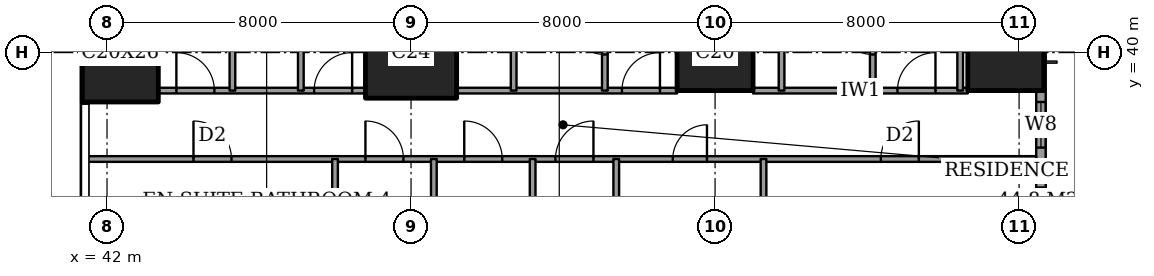
"""IFC4 building model, lengths in metres.
Left out: names, types, materials, properties, quantities, classifications, styles, units other than length and angle.
Written with IfcOpenShell. Run it as: python <this file> out.ifc"""

import sys

from ifc_helpers import new_model, si_unit, direction, frame, frame_2d, origin, origin_2d, place, context, subcontext, project, spatial, rectangle, extrude, element, fill, save


model = new_model("IFC4")
c1 = context("Model", 3, precision=1e-05, world=origin(), true_north=direction((0.0, 1.0)))
c2 = subcontext(c1, "Body", "Model", "MODEL_VIEW")
j1 = project(units=[si_unit("LENGTHUNIT", "METRE"), si_unit("PLANEANGLEUNIT", "RADIAN")], contexts=[c1])
p1 = place(None, origin())
s1 = spatial("IfcSite", under=j1, at=p1, CompositionType="ELEMENT")
p2 = place(p1, origin())
s2 = spatial("IfcBuilding", under=s1, at=p2, CompositionType="ELEMENT")
p3 = place(p2, frame((0.0, 0.0, 62.0)))
s3 = spatial("IfcBuildingStorey", under=s2, at=p3, CompositionType="ELEMENT", Elevation=62.0)
p4 = place(p3, frame((42.35, 40.0, 0.0), z_axis=(0.0, 0.0, 1.0), x_axis=(1.0, 0.0, 0.0)))
e1 = element("IfcColumn", 1, at=p4, inside=s3, PredefinedType="COLUMN", context=c2, shape_type="SweptSolid", body=[
    extrude(rectangle(XDim=2.0, YDim=2.6, at=origin_2d()), origin(), (0.0, 0.0, 1.0), 3.6),
])
p5 = place(p3, frame((50.0, 40.0, 0.0), z_axis=(0.0, 0.0, 1.0), x_axis=(1.0, 0.0, 0.0)))
e2 = element("IfcColumn", 2, at=p5, inside=s3, PredefinedType="COLUMN", context=c2, shape_type="SweptSolid", body=[
    extrude(rectangle(XDim=2.4, YDim=2.4, at=origin_2d()), origin(), (0.0, 0.0, 1.0), 3.6),
])
for number, where, z_axis, x_axis in (
    (3, (58.0, 40.0, 0.0), (0.0, 0.0, 1.0), (1.0, 0.0, 0.0)),
    (4, (65.65, 40.0, 0.0), (0.0, 0.0, 1.0), (1.0, 0.0, 0.0)),
):
    element("IfcColumn", number, at=place(p3, frame(where, z_axis=z_axis, x_axis=x_axis)), inside=s3, PredefinedType="COLUMN", context=c2, shape_type="SweptSolid", body=[
        extrude(rectangle(XDim=2.0, YDim=2.0, at=origin_2d()), origin(), (0.0, 0.0, 1.0), 3.6),
    ])
p6 = place(p3, frame((66.575, 3.175, 0.0), z_axis=(0.0, 0.0, 1.0), x_axis=(0.0, 1.0, 0.0)))
e5 = element("IfcWall", 5, at=p6, inside=s3, PredefinedType="SOLIDWALL", context=c2, shape_type="SweptSolid", body=[
    extrude(rectangle(XDim=41.65, YDim=0.25, at=frame_2d((20.825, 0.0))), origin(), (0.0, 0.0, 1.0), 3.6),
])
p7 = place(p6, frame((0.775, 0.0, 0.6)))
e6 = element("IfcOpeningElement", 6, at=p7, cuts=e5, PredefinedType="OPENING", context=c2, shape_type="SweptSolid", body=[
    extrude(rectangle(XDim=2.4, YDim=2.0, at=frame_2d((1.2, 1.0))), frame((0.0, 0.135, 0.0), z_axis=(0.0, -1.0, 0.0), x_axis=(1.0, 0.0, 0.0)), (0.0, 0.0, 1.0), 0.27),
])
p8 = place(p6, frame((6.1, 0.0, 0.6)))
e7 = element("IfcOpeningElement", 7, at=p8, cuts=e5, PredefinedType="OPENING", context=c2, shape_type="SweptSolid", body=[
    extrude(rectangle(XDim=1.2, YDim=2.0, at=frame_2d((0.6, 1.0))), frame((0.0, 0.135, 0.0), z_axis=(0.0, -1.0, 0.0), x_axis=(1.0, 0.0, 0.0)), (0.0, 0.0, 1.0), 0.27),
])
p9 = place(p6, frame((8.275, 0.0, 0.6)))
e8 = element("IfcOpeningElement", 8, at=p9, cuts=e5, PredefinedType="OPENING", context=c2, shape_type="SweptSolid", body=[
    extrude(rectangle(XDim=2.4, YDim=2.0, at=frame_2d((1.2, 1.0))), frame((0.0, 0.135, 0.0), z_axis=(0.0, -1.0, 0.0), x_axis=(1.0, 0.0, 0.0)), (0.0, 0.0, 1.0), 0.27),
])
p10 = place(p6, frame((15.775, 0.0, 0.6)))
e9 = element("IfcOpeningElement", 9, at=p10, cuts=e5, PredefinedType="OPENING", context=c2, shape_type="SweptSolid", body=[
    extrude(rectangle(XDim=2.4, YDim=2.0, at=frame_2d((1.2, 1.0))), frame((0.0, 0.135, 0.0), z_axis=(0.0, -1.0, 0.0), x_axis=(1.0, 0.0, 0.0)), (0.0, 0.0, 1.0), 0.27),
])
p11 = place(p6, frame((23.475, 0.0, 0.6)))
e10 = element("IfcOpeningElement", 10, at=p11, cuts=e5, PredefinedType="OPENING", context=c2, shape_type="SweptSolid", body=[
    extrude(rectangle(XDim=2.4, YDim=2.0, at=frame_2d((1.2, 1.0))), frame((0.0, 0.135, 0.0), z_axis=(0.0, -1.0, 0.0), x_axis=(1.0, 0.0, 0.0)), (0.0, 0.0, 1.0), 0.27),
])
p12 = place(p6, frame((30.875, 0.0, 0.6)))
e11 = element("IfcOpeningElement", 11, at=p12, cuts=e5, PredefinedType="OPENING", context=c2, shape_type="SweptSolid", body=[
    extrude(rectangle(XDim=2.4, YDim=2.0, at=frame_2d((1.2, 1.0))), frame((0.0, 0.135, 0.0), z_axis=(0.0, -1.0, 0.0), x_axis=(1.0, 0.0, 0.0)), (0.0, 0.0, 1.0), 0.27),
])
p13 = place(p6, frame((34.325, 0.0, 0.6)))
e12 = element("IfcOpeningElement", 12, at=p13, cuts=e5, PredefinedType="OPENING", context=c2, shape_type="SweptSolid", body=[
    extrude(rectangle(XDim=1.2, YDim=2.0, at=frame_2d((0.6, 1.0))), frame((0.0, 0.135, 0.0), z_axis=(0.0, -1.0, 0.0), x_axis=(1.0, 0.0, 0.0)), (0.0, 0.0, 1.0), 0.27),
])
p14 = place(p6, frame((38.475, 0.0, 0.6)))
e13 = element("IfcOpeningElement", 13, at=p14, cuts=e5, PredefinedType="OPENING", context=c2, shape_type="SweptSolid", body=[
    extrude(rectangle(XDim=2.4, YDim=2.0, at=frame_2d((1.2, 1.0))), frame((0.0, 0.135, 0.0), z_axis=(0.0, -1.0, 0.0), x_axis=(1.0, 0.0, 0.0)), (0.0, 0.0, 1.0), 0.27),
])
p15 = place(p3, frame((41.439, 37.2, 0.0), z_axis=(0.0, 0.0, 1.0), x_axis=(1.0, 0.0, 0.0)))
e14 = element("IfcWall", 14, at=p15, inside=s3, PredefinedType="PARTITIONING", context=c2, shape_type="SweptSolid", body=[
    extrude(rectangle(XDim=25.011, YDim=0.15, at=frame_2d((12.505, 0.0))), origin(), (0.0, 0.0, 1.0), 3.35),
])
p16 = place(p15, frame((12.361, 0.0, 0.0)))
e15 = element("IfcOpeningElement", 15, at=p16, cuts=e14, PredefinedType="OPENING", context=c2, shape_type="SweptSolid", body=[
    extrude(rectangle(XDim=1.0, YDim=2.1, at=frame_2d((0.5, 1.05))), frame((0.0, 0.085, 0.0), z_axis=(0.0, -1.0, 0.0), x_axis=(1.0, 0.0, 0.0)), (0.0, 0.0, 1.0), 0.17),
])
p17 = place(p15, frame((20.924, 0.0, 0.0)))
e16 = element("IfcOpeningElement", 16, at=p17, cuts=e14, PredefinedType="OPENING", context=c2, shape_type="SweptSolid", body=[
    extrude(rectangle(XDim=1.0, YDim=2.1, at=frame_2d((0.5, 1.05))), frame((0.0, 0.085, 0.0), z_axis=(0.0, -1.0, 0.0), x_axis=(1.0, 0.0, 0.0)), (0.0, 0.0, 1.0), 0.17),
])
p18 = place(p15, frame((15.448, 0.0, 0.0)))
e17 = element("IfcOpeningElement", 17, at=p18, cuts=e14, PredefinedType="OPENING", context=c2, shape_type="SweptSolid", body=[
    extrude(rectangle(XDim=0.9, YDim=2.1, at=frame_2d((0.45, 1.05))), frame((0.0, 0.085, 0.0), z_axis=(0.0, -1.0, 0.0), x_axis=(1.0, 0.0, 0.0)), (0.0, 0.0, 1.0), 0.17),
])
p19 = place(p15, frame((9.961, 0.0, 0.0)))
e18 = element("IfcOpeningElement", 18, at=p19, cuts=e14, PredefinedType="OPENING", context=c2, shape_type="SweptSolid", body=[
    extrude(rectangle(XDim=1.0, YDim=2.1, at=frame_2d((0.5, 1.05))), frame((0.0, 0.085, 0.0), z_axis=(0.0, -1.0, 0.0), x_axis=(1.0, 0.0, 0.0)), (0.0, 0.0, 1.0), 0.17),
])
p20 = place(p15, frame((7.361, 0.0, 0.0)))
e19 = element("IfcOpeningElement", 19, at=p20, cuts=e14, PredefinedType="OPENING", context=c2, shape_type="SweptSolid", body=[
    extrude(rectangle(XDim=1.0, YDim=2.1, at=frame_2d((0.5, 1.05))), frame((0.0, 0.085, 0.0), z_axis=(0.0, -1.0, 0.0), x_axis=(1.0, 0.0, 0.0)), (0.0, 0.0, 1.0), 0.17),
])
p21 = place(p15, frame((2.836, 0.0, 0.0)))
e20 = element("IfcOpeningElement", 20, at=p21, cuts=e14, PredefinedType="OPENING", context=c2, shape_type="SweptSolid", body=[
    extrude(rectangle(XDim=1.0, YDim=2.1, at=frame_2d((0.5, 1.05))), frame((0.0, 0.085, 0.0), z_axis=(0.0, -1.0, 0.0), x_axis=(1.0, 0.0, 0.0)), (0.0, 0.0, 1.0), 0.17),
])
p22 = place(p3, frame((43.35, 39.0, 0.0), z_axis=(0.0, 0.0, 1.0), x_axis=(1.0, 0.0, 0.0)))
e21 = element("IfcWall", 21, at=p22, inside=s3, PredefinedType="PARTITIONING", context=c2, shape_type="SweptSolid", body=[
    extrude(rectangle(XDim=5.45, YDim=0.15, at=frame_2d((2.725, 0.0))), origin(), (0.0, 0.0, 1.0), 3.35),
])
p23 = place(p22, frame((4.1, 0.0, 0.0)))
e22 = element("IfcOpeningElement", 22, at=p23, cuts=e21, PredefinedType="OPENING", context=c2, shape_type="SweptSolid", body=[
    extrude(rectangle(XDim=1.0, YDim=2.1, at=frame_2d((0.5, 1.05))), frame((0.0, 0.085, 0.0), z_axis=(0.0, -1.0, 0.0), x_axis=(1.0, 0.0, 0.0)), (0.0, 0.0, 1.0), 0.17),
])
p24 = place(p22, frame((0.475, 0.0, 0.0)))
e23 = element("IfcOpeningElement", 23, at=p24, cuts=e21, PredefinedType="OPENING", context=c2, shape_type="SweptSolid", body=[
    extrude(rectangle(XDim=1.0, YDim=2.1, at=frame_2d((0.5, 1.05))), frame((0.0, 0.085, 0.0), z_axis=(0.0, -1.0, 0.0), x_axis=(1.0, 0.0, 0.0)), (0.0, 0.0, 1.0), 0.17),
])
p25 = place(p3, frame((51.2, 39.0, 0.0), z_axis=(0.0, 0.0, 1.0), x_axis=(1.0, 0.0, 0.0)))
e24 = element("IfcWall", 24, at=p25, inside=s3, PredefinedType="PARTITIONING", context=c2, shape_type="SweptSolid", body=[
    extrude(rectangle(XDim=5.8, YDim=0.15, at=frame_2d((2.9, 0.0))), origin(), (0.0, 0.0, 1.0), 3.35),
])
p26 = place(p25, frame((4.35, 0.0, 0.0)))
e25 = element("IfcOpeningElement", 25, at=p26, cuts=e24, PredefinedType="OPENING", context=c2, shape_type="SweptSolid", body=[
    extrude(rectangle(XDim=1.0, YDim=2.1, at=frame_2d((0.5, 1.05))), frame((0.0, 0.085, 0.0), z_axis=(0.0, -1.0, 0.0), x_axis=(1.0, 0.0, 0.0)), (0.0, 0.0, 1.0), 0.17),
])
p27 = place(p3, frame((59.0, 39.0, 0.0), z_axis=(0.0, 0.0, 1.0), x_axis=(1.0, 0.0, 0.0)))
e26 = element("IfcWall", 26, at=p27, inside=s3, PredefinedType="PARTITIONING", context=c2, shape_type="SweptSolid", body=[
    extrude(rectangle(XDim=5.65, YDim=0.15, at=frame_2d((2.825, 0.0))), origin(), (0.0, 0.0, 1.0), 3.35),
])
p28 = place(p27, frame((3.8, 0.0, 0.0)))
e27 = element("IfcOpeningElement", 27, at=p28, cuts=e26, PredefinedType="OPENING", context=c2, shape_type="SweptSolid", body=[
    extrude(rectangle(XDim=1.0, YDim=2.1, at=frame_2d((0.5, 1.05))), frame((0.0, 0.085, 0.0), z_axis=(0.0, -1.0, 0.0), x_axis=(1.0, 0.0, 0.0)), (0.0, 0.0, 1.0), 0.17),
])
p29 = place(p3, frame((45.3, 39.0, 0.0), z_axis=(0.0, 0.0, 1.0), x_axis=(0.0, 1.0, 0.0)))
e28 = element("IfcWall", 28, at=p29, inside=s3, PredefinedType="PARTITIONING", context=c2, shape_type="SweptSolid", body=[
    extrude(rectangle(XDim=9.45, YDim=0.15, at=frame_2d((4.725, 0.0))), origin(), (0.0, 0.0, 1.0), 3.35),
])
p30 = place(p3, frame((47.1, 39.0, 0.0), z_axis=(0.0, 0.0, 1.0), x_axis=(0.0, 1.0, 0.0)))
e29 = element("IfcWall", 29, at=p30, inside=s3, PredefinedType="PARTITIONING", context=c2, shape_type="SweptSolid", body=[
    extrude(rectangle(XDim=3.8, YDim=0.15, at=frame_2d((1.9, 0.0))), origin(), (0.0, 0.0, 1.0), 3.35),
])
p31 = place(p30, frame((1.45, 0.0, 0.0)))
e30 = element("IfcOpeningElement", 30, at=p31, cuts=e29, PredefinedType="OPENING", context=c2, shape_type="SweptSolid", body=[
    extrude(rectangle(XDim=0.9, YDim=2.1, at=frame_2d((0.45, 1.05))), frame((0.0, 0.085, 0.0), z_axis=(0.0, -1.0, 0.0), x_axis=(1.0, 0.0, 0.0)), (0.0, 0.0, 1.0), 0.17),
])
p32 = place(p3, frame((48.0, 30.5, 0.0), z_axis=(0.0, 0.0, 1.0), x_axis=(0.0, 1.0, 0.0)))
e31 = element("IfcWall", 31, at=p32, inside=s3, PredefinedType="PARTITIONING", context=c2, shape_type="SweptSolid", body=[
    extrude(rectangle(XDim=6.7, YDim=0.15, at=frame_2d((3.35, 0.0))), origin(), (0.0, 0.0, 1.0), 3.35),
])
p33 = place(p3, frame((50.6, 33.2, 0.0), z_axis=(0.0, 0.0, 1.0), x_axis=(0.0, 1.0, 0.0)))
e32 = element("IfcWall", 32, at=p33, inside=s3, PredefinedType="PARTITIONING", context=c2, shape_type="SweptSolid", body=[
    extrude(rectangle(XDim=4.0, YDim=0.15, at=frame_2d((2.0, 0.0))), origin(), (0.0, 0.0, 1.0), 3.35),
])
p34 = place(p3, frame((52.7, 39.0, 0.0), z_axis=(0.0, 0.0, 1.0), x_axis=(0.0, 1.0, 0.0)))
e33 = element("IfcWall", 33, at=p34, inside=s3, PredefinedType="PARTITIONING", context=c2, shape_type="SweptSolid", body=[
    extrude(rectangle(XDim=9.45, YDim=0.15, at=frame_2d((4.725, 0.0))), origin(), (0.0, 0.0, 1.0), 3.35),
])
p35 = place(p34, frame((5.675, 0.0, 0.0)))
e34 = element("IfcOpeningElement", 34, at=p35, cuts=e33, PredefinedType="OPENING", context=c2, shape_type="SweptSolid", body=[
    extrude(rectangle(XDim=0.9, YDim=2.1, at=frame_2d((0.45, 1.05))), frame((0.0, 0.085, 0.0), z_axis=(0.0, -1.0, 0.0), x_axis=(1.0, 0.0, 0.0)), (0.0, 0.0, 1.0), 0.17),
])
p36 = place(p3, frame((53.2, 30.0, 0.0), z_axis=(0.0, 0.0, 1.0), x_axis=(0.0, 1.0, 0.0)))
e35 = element("IfcWall", 35, at=p36, inside=s3, PredefinedType="PARTITIONING", context=c2, shape_type="SweptSolid", body=[
    extrude(rectangle(XDim=7.2, YDim=0.15, at=frame_2d((3.6, 0.0))), origin(), (0.0, 0.0, 1.0), 3.35),
])
p37 = place(p3, frame((55.1, 39.0, 0.0), z_axis=(0.0, 0.0, 1.0), x_axis=(0.0, 1.0, 0.0)))
e36 = element("IfcWall", 36, at=p37, inside=s3, PredefinedType="PARTITIONING", context=c2, shape_type="SweptSolid", body=[
    extrude(rectangle(XDim=2.8, YDim=0.15, at=frame_2d((1.4, 0.0))), origin(), (0.0, 0.0, 1.0), 3.35),
])
p38 = place(p37, frame((0.95, 0.0, 0.0)))
e37 = element("IfcOpeningElement", 37, at=p38, cuts=e36, PredefinedType="OPENING", context=c2, shape_type="SweptSolid", body=[
    extrude(rectangle(XDim=0.9, YDim=2.1, at=frame_2d((0.45, 1.05))), frame((0.0, 0.085, 0.0), z_axis=(0.0, -1.0, 0.0), x_axis=(1.0, 0.0, 0.0)), (0.0, 0.0, 1.0), 0.17),
])
p39 = place(p3, frame((55.4, 28.0, 0.0), z_axis=(0.0, 0.0, 1.0), x_axis=(0.0, 1.0, 0.0)))
e38 = element("IfcWall", 38, at=p39, inside=s3, PredefinedType="PARTITIONING", context=c2, shape_type="SweptSolid", body=[
    extrude(rectangle(XDim=9.2, YDim=0.15, at=frame_2d((4.6, 0.0))), origin(), (0.0, 0.0, 1.0), 3.35),
])
p40 = place(p39, frame((0.5, 0.0, 0.0)))
e39 = element("IfcOpeningElement", 39, at=p40, cuts=e38, PredefinedType="OPENING", context=c2, shape_type="SweptSolid", body=[
    extrude(rectangle(XDim=1.0, YDim=2.1, at=frame_2d((0.5, 1.05))), frame((0.0, 0.085, 0.0), z_axis=(0.0, -1.0, 0.0), x_axis=(1.0, 0.0, 0.0)), (0.0, 0.0, 1.0), 0.17),
])
p41 = place(p3, frame((59.275, 33.2, 0.0), z_axis=(0.0, 0.0, 1.0), x_axis=(0.0, 1.0, 0.0)))
e40 = element("IfcWall", 40, at=p41, inside=s3, PredefinedType="PARTITIONING", context=c2, shape_type="SweptSolid", body=[
    extrude(rectangle(XDim=4.0, YDim=0.15, at=frame_2d((2.0, 0.0))), origin(), (0.0, 0.0, 1.0), 3.35),
])
p42 = place(p3, frame((59.75, 39.0, 0.0), z_axis=(0.0, 0.0, 1.0), x_axis=(0.0, 1.0, 0.0)))
e41 = element("IfcWall", 41, at=p42, inside=s3, PredefinedType="PARTITIONING", context=c2, shape_type="SweptSolid", body=[
    extrude(rectangle(XDim=9.45, YDim=0.15, at=frame_2d((4.725, 0.0))), origin(), (0.0, 0.0, 1.0), 3.35),
])
p43 = place(p42, frame((5.675, 0.0, 0.0)))
e42 = element("IfcOpeningElement", 42, at=p43, cuts=e41, PredefinedType="OPENING", context=c2, shape_type="SweptSolid", body=[
    extrude(rectangle(XDim=0.9, YDim=2.1, at=frame_2d((0.45, 1.05))), frame((0.0, 0.085, 0.0), z_axis=(0.0, -1.0, 0.0), x_axis=(1.0, 0.0, 0.0)), (0.0, 0.0, 1.0), 0.17),
])
p44 = place(p3, frame((62.15, 39.0, 0.0), z_axis=(0.0, 0.0, 1.0), x_axis=(0.0, 1.0, 0.0)))
e43 = element("IfcWall", 43, at=p44, inside=s3, PredefinedType="PARTITIONING", context=c2, shape_type="SweptSolid", body=[
    extrude(rectangle(XDim=2.8, YDim=0.15, at=frame_2d((1.4, 0.0))), origin(), (0.0, 0.0, 1.0), 3.35),
])
p45 = place(p44, frame((0.95, 0.0, 0.0)))
e44 = element("IfcOpeningElement", 44, at=p45, cuts=e43, PredefinedType="OPENING", context=c2, shape_type="SweptSolid", body=[
    extrude(rectangle(XDim=0.9, YDim=2.1, at=frame_2d((0.45, 1.05))), frame((0.0, 0.085, 0.0), z_axis=(0.0, -1.0, 0.0), x_axis=(1.0, 0.0, 0.0)), (0.0, 0.0, 1.0), 0.17),
])
p46 = place(p3, frame((64.45, 39.0, 0.0), z_axis=(0.0, 0.0, 1.0), x_axis=(0.0, 1.0, 0.0)))
e45 = element("IfcWall", 45, at=p46, inside=s3, PredefinedType="PARTITIONING", context=c2, shape_type="SweptSolid", body=[
    extrude(rectangle(XDim=5.7, YDim=0.15, at=frame_2d((2.85, 0.0))), origin(), (0.0, 0.0, 1.0), 3.35),
])
p47 = place(p46, frame((2.4, 0.0, 0.0)))
e46 = element("IfcOpeningElement", 46, at=p47, cuts=e45, PredefinedType="OPENING", context=c2, shape_type="SweptSolid", body=[
    extrude(rectangle(XDim=0.9, YDim=2.1, at=frame_2d((0.45, 1.05))), frame((0.0, 0.085, 0.0), z_axis=(0.0, -1.0, 0.0), x_axis=(1.0, 0.0, 0.0)), (0.0, 0.0, 1.0), 0.17),
])
p48 = place(p12, origin())
e47 = element("IfcWindow", 47, at=p48, inside=s3, PartitioningType="SINGLE_PANEL", PredefinedType="WINDOW", context=c2, shape_type="SweptSolid", body=[
    extrude(rectangle(XDim=2.4, YDim=2.0, at=frame_2d((1.2, 1.0))), frame((0.0, 0.03, 0.0), z_axis=(0.0, -1.0, 0.0), x_axis=(1.0, 0.0, 0.0)), (0.0, 0.0, 1.0), 0.06),
])
fill(e11, e47)
p49 = place(p13, origin())
e48 = element("IfcWindow", 48, at=p49, inside=s3, PartitioningType="SINGLE_PANEL", PredefinedType="WINDOW", context=c2, shape_type="SweptSolid", body=[
    extrude(rectangle(XDim=1.2, YDim=2.0, at=frame_2d((0.6, 1.0))), frame((0.0, 0.03, 0.0), z_axis=(0.0, -1.0, 0.0), x_axis=(1.0, 0.0, 0.0)), (0.0, 0.0, 1.0), 0.06),
])
fill(e12, e48)
p50 = place(p45, origin())
e49 = element("IfcDoor", 49, at=p50, inside=s3, OperationType="SINGLE_SWING_LEFT", PredefinedType="DOOR", context=c2, shape_type="SweptSolid", body=[
    extrude(rectangle(XDim=0.9, YDim=2.1, at=frame_2d((0.45, 1.05))), frame((0.0, 0.025, 0.0), z_axis=(0.0, -1.0, 0.0), x_axis=(1.0, 0.0, 0.0)), (0.0, 0.0, 1.0), 0.05),
])
fill(e44, e49)
p51 = place(p28, origin())
e50 = element("IfcDoor", 50, at=p51, inside=s3, OperationType="SINGLE_SWING_LEFT", PredefinedType="DOOR", context=c2, shape_type="SweptSolid", body=[
    extrude(rectangle(XDim=1.0, YDim=2.1, at=frame_2d((0.5, 1.05))), frame((0.0, 0.025, 0.0), z_axis=(0.0, -1.0, 0.0), x_axis=(1.0, 0.0, 0.0)), (0.0, 0.0, 1.0), 0.05),
])
fill(e27, e50)
p52 = place(p38, origin())
e51 = element("IfcDoor", 51, at=p52, inside=s3, OperationType="SINGLE_SWING_LEFT", PredefinedType="DOOR", context=c2, shape_type="SweptSolid", body=[
    extrude(rectangle(XDim=0.9, YDim=2.1, at=frame_2d((0.45, 1.05))), frame((0.0, 0.025, 0.0), z_axis=(0.0, -1.0, 0.0), x_axis=(1.0, 0.0, 0.0)), (0.0, 0.0, 1.0), 0.05),
])
fill(e37, e51)
p53 = place(p26, origin())
e52 = element("IfcDoor", 52, at=p53, inside=s3, OperationType="SINGLE_SWING_LEFT", PredefinedType="DOOR", context=c2, shape_type="SweptSolid", body=[
    extrude(rectangle(XDim=1.0, YDim=2.1, at=frame_2d((0.5, 1.05))), frame((0.0, 0.025, 0.0), z_axis=(0.0, -1.0, 0.0), x_axis=(1.0, 0.0, 0.0)), (0.0, 0.0, 1.0), 0.05),
])
fill(e25, e52)
p54 = place(p23, origin())
e53 = element("IfcDoor", 53, at=p54, inside=s3, OperationType="SINGLE_SWING_LEFT", PredefinedType="DOOR", context=c2, shape_type="SweptSolid", body=[
    extrude(rectangle(XDim=1.0, YDim=2.1, at=frame_2d((0.5, 1.05))), frame((0.0, 0.025, 0.0), z_axis=(0.0, -1.0, 0.0), x_axis=(1.0, 0.0, 0.0)), (0.0, 0.0, 1.0), 0.05),
])
fill(e22, e53)
p55 = place(p24, origin())
e54 = element("IfcDoor", 54, at=p55, inside=s3, OperationType="SINGLE_SWING_RIGHT", PredefinedType="DOOR", context=c2, shape_type="SweptSolid", body=[
    extrude(rectangle(XDim=1.0, YDim=2.1, at=frame_2d((0.5, 1.05))), frame((0.0, 0.025, 0.0), z_axis=(0.0, -1.0, 0.0), x_axis=(1.0, 0.0, 0.0)), (0.0, 0.0, 1.0), 0.05),
])
fill(e23, e54)
p56 = place(p16, origin())
e55 = element("IfcDoor", 55, at=p56, inside=s3, OperationType="SINGLE_SWING_LEFT", PredefinedType="DOOR", context=c2, shape_type="SweptSolid", body=[
    extrude(rectangle(XDim=1.0, YDim=2.1, at=frame_2d((0.5, 1.05))), frame((0.0, 0.025, 0.0), z_axis=(0.0, -1.0, 0.0), x_axis=(1.0, 0.0, 0.0)), (0.0, 0.0, 1.0), 0.05),
])
fill(e15, e55)
p57 = place(p17, origin())
e56 = element("IfcDoor", 56, at=p57, inside=s3, OperationType="SINGLE_SWING_LEFT", PredefinedType="DOOR", context=c2, shape_type="SweptSolid", body=[
    extrude(rectangle(XDim=1.0, YDim=2.1, at=frame_2d((0.5, 1.05))), frame((0.0, 0.025, 0.0), z_axis=(0.0, -1.0, 0.0), x_axis=(1.0, 0.0, 0.0)), (0.0, 0.0, 1.0), 0.05),
])
fill(e16, e56)
p58 = place(p18, origin())
e57 = element("IfcDoor", 57, at=p58, inside=s3, OperationType="SINGLE_SWING_LEFT", PredefinedType="DOOR", context=c2, shape_type="SweptSolid", body=[
    extrude(rectangle(XDim=0.9, YDim=2.1, at=frame_2d((0.45, 1.05))), frame((0.0, 0.025, 0.0), z_axis=(0.0, -1.0, 0.0), x_axis=(1.0, 0.0, 0.0)), (0.0, 0.0, 1.0), 0.05),
])
fill(e17, e57)
p59 = place(p19, origin())
e58 = element("IfcDoor", 58, at=p59, inside=s3, OperationType="SINGLE_SWING_RIGHT", PredefinedType="DOOR", context=c2, shape_type="SweptSolid", body=[
    extrude(rectangle(XDim=1.0, YDim=2.1, at=frame_2d((0.5, 1.05))), frame((0.0, 0.025, 0.0), z_axis=(0.0, -1.0, 0.0), x_axis=(1.0, 0.0, 0.0)), (0.0, 0.0, 1.0), 0.05),
])
fill(e18, e58)
p60 = place(p20, origin())
e59 = element("IfcDoor", 59, at=p60, inside=s3, OperationType="SINGLE_SWING_RIGHT", PredefinedType="DOOR", context=c2, shape_type="SweptSolid", body=[
    extrude(rectangle(XDim=1.0, YDim=2.1, at=frame_2d((0.5, 1.05))), frame((0.0, 0.025, 0.0), z_axis=(0.0, -1.0, 0.0), x_axis=(1.0, 0.0, 0.0)), (0.0, 0.0, 1.0), 0.05),
])
fill(e19, e59)
p61 = place(p21, origin())
e60 = element("IfcDoor", 60, at=p61, inside=s3, OperationType="SINGLE_SWING_RIGHT", PredefinedType="DOOR", context=c2, shape_type="SweptSolid", body=[
    extrude(rectangle(XDim=1.0, YDim=2.1, at=frame_2d((0.5, 1.05))), frame((0.0, 0.025, 0.0), z_axis=(0.0, -1.0, 0.0), x_axis=(1.0, 0.0, 0.0)), (0.0, 0.0, 1.0), 0.05),
])
fill(e20, e60)
save(model, sys.argv[1])
